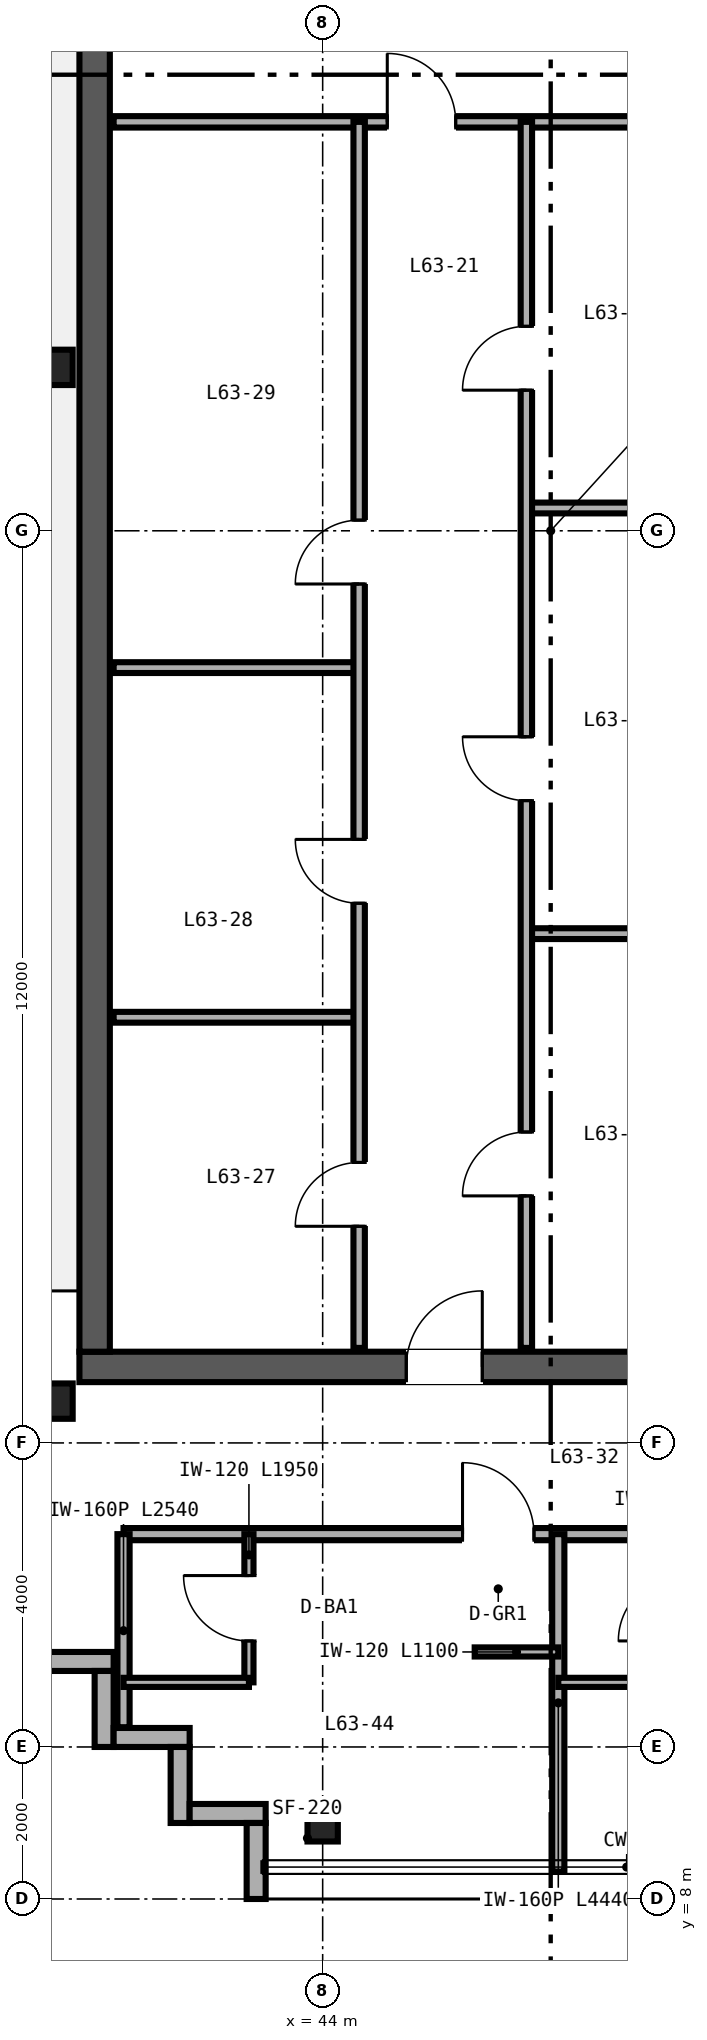
"""IFC4 building model, lengths in metres.
Left out: names, types, materials, properties, quantities, classifications, styles, units other than length and angle.
Written with IfcOpenShell. Run it as: python <this file> out.ifc"""

import sys

from ifc_helpers import new_model, si_unit, direction, frame, frame_2d, origin, origin_2d, place, context, subcontext, project, spatial, rectangle, i_section, extrude, source, transform, mapped, element, fill, save


model = new_model("IFC4")
c1 = context("Model", 3, precision=1e-05, world=origin(), true_north=direction((0.0, 1.0)))
c2 = subcontext(c1, "Body", "Model", "MODEL_VIEW")
j1 = project(units=[si_unit("LENGTHUNIT", "METRE"), si_unit("PLANEANGLEUNIT", "RADIAN")], contexts=[c1])
p1 = place(None, origin())
s1 = spatial("IfcSite", under=j1, at=p1, CompositionType="ELEMENT")
p2 = place(p1, origin())
s2 = spatial("IfcBuilding", under=s1, at=p2, CompositionType="ELEMENT")
p3 = place(p2, frame((0.0, 0.0, 250.8)))
s3 = spatial("IfcBuildingStorey", under=s2, at=p3, CompositionType="ELEMENT", Elevation=250.8)
p4 = place(p3, frame((40.8, 15.0, 0.0), z_axis=(0.0, 0.0, 1.0), x_axis=(1.0, 0.0, 0.0)))
e1 = element("IfcWall", 1, at=p4, inside=s3, PredefinedType="SHEAR", context=c2, shape_type="SweptSolid", body=[
    extrude(rectangle(XDim=12.4, YDim=0.4, at=frame_2d((6.2, 0.0))), origin(), (0.0, 0.0, 1.0), 3.38),
])
p5 = place(p4, frame((4.3, 0.0, 0.0)))
e2 = element("IfcOpeningElement", 2, at=p5, cuts=e1, PredefinedType="OPENING", context=c2, shape_type="SweptSolid", body=[
    extrude(rectangle(XDim=1.0, YDim=2.15, at=frame_2d((0.5, 1.075))), frame((0.0, 0.21, 0.0), z_axis=(0.0, -1.0, 0.0), x_axis=(1.0, 0.0, 0.0)), (0.0, 0.0, 1.0), 0.42),
])
p6 = place(p3, frame((41.0, 15.2, 0.0), z_axis=(0.0, 0.0, 1.0), x_axis=(0.0, 1.0, 0.0)))
e3 = element("IfcWall", 3, at=p6, inside=s3, PredefinedType="SHEAR", context=c2, shape_type="SweptSolid", body=[
    extrude(rectangle(XDim=21.6, YDim=0.4, at=frame_2d((10.8, 0.0))), origin(), (0.0, 0.0, 1.0), 3.38),
])
m1 = source(origin(), c2, "Body", "SweptSolid", [
    extrude(i_section(OverallWidth=0.422, OverallDepth=0.465, WebThickness=0.045, FlangeThickness=0.073, FilletRadius=0.025, at=origin_2d()), origin(), (0.0, 0.0, 1.0), 3.38),
])
for number, where, z_axis, x_axis in (
    (4, (40.5, 14.55, 0.0), (0.0, 0.0, 1.0), (1.0, 0.0, 0.0)),
    (5, (40.5, 28.15, 0.0), (0.0, 0.0, 1.0), (1.0, 0.0, 0.0)),
):
    element("IfcColumn", number, at=place(p3, frame(where, z_axis=z_axis, x_axis=x_axis)), inside=s3, PredefinedType="COLUMN", context=c2, shape_type="MappedRepresentation", body=[
        mapped(m1, transform((0.0, 0.0, 0.0), scale=1.0)),
    ])
m2 = source(origin(), c2, "Body", "SweptSolid", [
    extrude(i_section(OverallWidth=0.399, OverallDepth=0.387, WebThickness=0.021, FlangeThickness=0.033, FilletRadius=0.025, at=origin_2d()), origin(), (0.0, 0.0, 1.0), 3.38),
])
p7 = place(p3, frame((44.0, 8.95, 0.0), z_axis=(0.0, 0.0, 1.0), x_axis=(1.0, 0.0, 0.0)))
e6 = element("IfcColumn", 6, at=p7, inside=s3, PredefinedType="COLUMN", context=c2, shape_type="MappedRepresentation", body=[
    mapped(m2, transform((0.0, 0.0, 0.0), scale=1.0)),
])
p8 = place(p3, frame((40.0, 11.125, 0.0), z_axis=(0.0, 0.0, 1.0), x_axis=(1.0, 0.0, 0.0)))
e7 = element("IfcWall", 7, at=p8, inside=s3, PredefinedType="SOLIDWALL", context=c2, shape_type="SweptSolid", body=[
    extrude(rectangle(XDim=1.25, YDim=0.25, at=frame_2d((0.625, 0.0))), origin(), (0.0, 0.0, 1.0), 3.38),
])
for number, where, z_axis, x_axis in (
    (8, (41.125, 11.0, 0.0), (0.0, 0.0, 1.0), (0.0, -1.0, 0.0)),
    (9, (41.25, 10.125, 0.0), (0.0, 0.0, 1.0), (1.0, 0.0, 0.0)),
    (10, (42.125, 10.0, 0.0), (0.0, 0.0, 1.0), (0.0, -1.0, 0.0)),
    (11, (42.25, 9.125, 0.0), (0.0, 0.0, 1.0), (1.0, 0.0, 0.0)),
    (12, (43.125, 9.0, 0.0), (0.0, 0.0, 1.0), (0.0, -1.0, 0.0)),
):
    element("IfcWall", number, at=place(p3, frame(where, z_axis=z_axis, x_axis=x_axis)), inside=s3, PredefinedType="SOLIDWALL", context=c2, shape_type="SweptSolid", body=[
        extrude(rectangle(XDim=1.0, YDim=0.25, at=frame_2d((0.5, 0.0))), origin(), (0.0, 0.0, 1.0), 3.38),
    ])
p9 = place(p3, frame((41.25, 31.38, 0.0), z_axis=(0.0, 0.0, 1.0), x_axis=(1.0, 0.0, 0.0)))
e13 = element("IfcWall", 13, at=p9, inside=s3, PredefinedType="PARTITIONING", context=c2, shape_type="SweptSolid", body=[
    extrude(rectangle(XDim=7.87, YDim=0.15, at=frame_2d((3.935, 0.0))), origin(), (0.0, 0.0, 1.0), 2.48),
])
p10 = place(p9, frame((3.6, 0.0, 0.0)))
e14 = element("IfcOpeningElement", 14, at=p10, cuts=e13, PredefinedType="OPENING", context=c2, shape_type="SweptSolid", body=[
    extrude(rectangle(XDim=0.9, YDim=2.15, at=frame_2d((0.45, 1.075))), frame((0.0, 0.085, 0.0), z_axis=(0.0, -1.0, 0.0), x_axis=(1.0, 0.0, 0.0)), (0.0, 0.0, 1.0), 0.17),
])
for number, where, z_axis, x_axis in (
    (15, (46.68, 20.7, 0.0), (0.0, 0.0, 1.0), (1.0, 0.0, 0.0)),
    (16, (46.68, 26.3, 0.0), (0.0, 0.0, 1.0), (1.0, 0.0, 0.0)),
):
    element("IfcWall", number, at=place(p3, frame(where, z_axis=z_axis, x_axis=x_axis)), inside=s3, PredefinedType="PARTITIONING", context=c2, shape_type="SweptSolid", body=[
        extrude(rectangle(XDim=2.44, YDim=0.142, at=frame_2d((1.22, 0.0))), origin(), (0.0, 0.0, 1.0), 3.38),
    ])
p11 = place(p3, frame((46.68, 15.25, 0.0), z_axis=(0.0, 0.0, 1.0), x_axis=(0.0, 1.0, 0.0)))
e17 = element("IfcWall", 17, at=p11, inside=s3, PredefinedType="PARTITIONING", context=c2, shape_type="SweptSolid", body=[
    extrude(rectangle(XDim=16.13, YDim=0.15, at=frame_2d((8.065, 0.0))), origin(), (0.0, 0.0, 1.0), 2.453),
])
p12 = place(p11, frame((2.0, 0.0, 0.0)))
e18 = element("IfcOpeningElement", 18, at=p12, cuts=e17, PredefinedType="OPENING", context=c2, shape_type="SweptSolid", body=[
    extrude(rectangle(XDim=0.84, YDim=2.1, at=frame_2d((0.42, 1.05))), frame((0.0, 0.085, 0.0), z_axis=(0.0, -1.0, 0.0), x_axis=(1.0, 0.0, 0.0)), (0.0, 0.0, 1.0), 0.17),
])
p13 = place(p11, frame((7.2, 0.0, 0.0)))
e19 = element("IfcOpeningElement", 19, at=p13, cuts=e17, PredefinedType="OPENING", context=c2, shape_type="SweptSolid", body=[
    extrude(rectangle(XDim=0.84, YDim=2.1, at=frame_2d((0.42, 1.05))), frame((0.0, 0.085, 0.0), z_axis=(0.0, -1.0, 0.0), x_axis=(1.0, 0.0, 0.0)), (0.0, 0.0, 1.0), 0.17),
])
p14 = place(p11, frame((12.6, 0.0, 0.0)))
e20 = element("IfcOpeningElement", 20, at=p14, cuts=e17, PredefinedType="OPENING", context=c2, shape_type="SweptSolid", body=[
    extrude(rectangle(XDim=0.84, YDim=2.1, at=frame_2d((0.42, 1.05))), frame((0.0, 0.085, 0.0), z_axis=(0.0, -1.0, 0.0), x_axis=(1.0, 0.0, 0.0)), (0.0, 0.0, 1.0), 0.17),
])
for number, where, z_axis, x_axis in (
    (21, (41.25, 19.6, 0.0), (0.0, 0.0, 1.0), (1.0, 0.0, 0.0)),
    (22, (41.25, 24.2, 0.0), (0.0, 0.0, 1.0), (1.0, 0.0, 0.0)),
):
    element("IfcWall", number, at=place(p3, frame(where, z_axis=z_axis, x_axis=x_axis)), inside=s3, PredefinedType="PARTITIONING", context=c2, shape_type="SweptSolid", body=[
        extrude(rectangle(XDim=3.23, YDim=0.142, at=frame_2d((1.615, 0.0))), origin(), (0.0, 0.0, 1.0), 3.38),
    ])
p15 = place(p3, frame((44.48, 15.25, 0.0), z_axis=(0.0, 0.0, 1.0), x_axis=(0.0, 1.0, 0.0)))
e23 = element("IfcWall", 23, at=p15, inside=s3, PredefinedType="PARTITIONING", context=c2, shape_type="SweptSolid", body=[
    extrude(rectangle(XDim=16.13, YDim=0.15, at=frame_2d((8.065, 0.0))), origin(), (0.0, 0.0, 1.0), 2.453),
])
p16 = place(p15, frame((1.6, 0.0, 0.0)))
e24 = element("IfcOpeningElement", 24, at=p16, cuts=e23, PredefinedType="OPENING", context=c2, shape_type="SweptSolid", body=[
    extrude(rectangle(XDim=0.84, YDim=2.1, at=frame_2d((0.42, 1.05))), frame((0.0, 0.085, 0.0), z_axis=(0.0, -1.0, 0.0), x_axis=(1.0, 0.0, 0.0)), (0.0, 0.0, 1.0), 0.17),
])
p17 = place(p15, frame((5.85, 0.0, 0.0)))
e25 = element("IfcOpeningElement", 25, at=p17, cuts=e23, PredefinedType="OPENING", context=c2, shape_type="SweptSolid", body=[
    extrude(rectangle(XDim=0.84, YDim=2.1, at=frame_2d((0.42, 1.05))), frame((0.0, 0.085, 0.0), z_axis=(0.0, -1.0, 0.0), x_axis=(1.0, 0.0, 0.0)), (0.0, 0.0, 1.0), 0.17),
])
p18 = place(p15, frame((10.05, 0.0, 0.0)))
e26 = element("IfcOpeningElement", 26, at=p18, cuts=e23, PredefinedType="OPENING", context=c2, shape_type="SweptSolid", body=[
    extrude(rectangle(XDim=0.84, YDim=2.1, at=frame_2d((0.42, 1.05))), frame((0.0, 0.085, 0.0), z_axis=(0.0, -1.0, 0.0), x_axis=(1.0, 0.0, 0.0)), (0.0, 0.0, 1.0), 0.17),
])
p19 = place(p3, frame((41.38, 12.8, 0.0), z_axis=(0.0, 0.0, 1.0), x_axis=(1.0, 0.0, 0.0)))
e27 = element("IfcWall", 27, at=p19, inside=s3, PredefinedType="PARTITIONING", context=c2, shape_type="SweptSolid", body=[
    extrude(rectangle(XDim=11.52, YDim=0.16, at=frame_2d((5.76, 0.0))), origin(), (0.0, 0.0, 1.0), 3.38),
])
p20 = place(p19, frame((4.46, 0.0, 0.0)))
e28 = element("IfcOpeningElement", 28, at=p20, cuts=e27, PredefinedType="OPENING", context=c2, shape_type="SweptSolid", body=[
    extrude(rectangle(XDim=0.94, YDim=2.15, at=frame_2d((0.47, 1.075))), frame((0.0, 0.09, 0.0), z_axis=(0.0, -1.0, 0.0), x_axis=(1.0, 0.0, 0.0)), (0.0, 0.0, 1.0), 0.18),
])
p21 = place(p19, frame((10.26, 0.0, 0.0)))
e29 = element("IfcOpeningElement", 29, at=p21, cuts=e27, PredefinedType="OPENING", context=c2, shape_type="SweptSolid", body=[
    extrude(rectangle(XDim=0.94, YDim=2.15, at=frame_2d((0.47, 1.075))), frame((0.0, 0.09, 0.0), z_axis=(0.0, -1.0, 0.0), x_axis=(1.0, 0.0, 0.0)), (0.0, 0.0, 1.0), 0.18),
])
p22 = place(p3, frame((41.38, 10.26, 0.0), z_axis=(0.0, 0.0, 1.0), x_axis=(0.0, 1.0, 0.0)))
e30 = element("IfcWall", 30, at=p22, inside=s3, PredefinedType="PARTITIONING", context=c2, shape_type="SweptSolid", body=[
    extrude(rectangle(XDim=2.54, YDim=0.16, at=frame_2d((1.27, 0.0))), origin(), (0.0, 0.0, 1.0), 3.38),
])
p23 = place(p3, frame((47.1, 8.36, 0.0), z_axis=(0.0, 0.0, 1.0), x_axis=(0.0, 1.0, 0.0)))
e31 = element("IfcWall", 31, at=p23, inside=s3, PredefinedType="PARTITIONING", context=c2, shape_type="SweptSolid", body=[
    extrude(rectangle(XDim=4.44, YDim=0.16, at=frame_2d((2.22, 0.0))), origin(), (0.0, 0.0, 1.0), 2.687),
])
p24 = place(p3, frame((43.03, 10.85, 0.0), z_axis=(0.0, 0.0, 1.0), x_axis=(0.0, 1.0, 0.0)))
e32 = element("IfcWall", 32, at=p24, inside=s3, PredefinedType="PARTITIONING", context=c2, shape_type="SweptSolid", body=[
    extrude(rectangle(XDim=1.95, YDim=0.12, at=frame_2d((0.975, 0.0))), origin(), (0.0, 0.0, 1.0), 3.38),
])
p25 = place(p24, frame((0.545, 0.0, 0.0)))
e33 = element("IfcOpeningElement", 33, at=p25, cuts=e32, PredefinedType="OPENING", context=c2, shape_type="SweptSolid", body=[
    extrude(rectangle(XDim=0.86, YDim=2.1, at=frame_2d((0.43, 1.05))), frame((0.0, 0.07, 0.0), z_axis=(0.0, -1.0, 0.0), x_axis=(1.0, 0.0, 0.0)), (0.0, 0.0, 1.0), 0.14),
])
p26 = place(p3, frame((41.38, 10.85, 0.0), z_axis=(0.0, 0.0, 1.0), x_axis=(1.0, 0.0, 0.0)))
e34 = element("IfcWall", 34, at=p26, inside=s3, PredefinedType="PARTITIONING", context=c2, shape_type="SweptSolid", body=[
    extrude(rectangle(XDim=1.65, YDim=0.12, at=frame_2d((0.825, 0.0))), origin(), (0.0, 0.0, 1.0), 3.38),
])
p27 = place(p3, frame((46.0, 11.25, 0.0), z_axis=(0.0, 0.0, 1.0), x_axis=(1.0, 0.0, 0.0)))
e35 = element("IfcWall", 35, at=p27, inside=s3, PredefinedType="PARTITIONING", context=c2, shape_type="SweptSolid", body=[
    extrude(rectangle(XDim=1.1, YDim=0.12, at=frame_2d((0.55, 0.0))), origin(), (0.0, 0.0, 1.0), 3.38),
])
p28 = place(p3, frame((47.1, 10.85, 0.0), z_axis=(0.0, 0.0, 1.0), x_axis=(1.0, 0.0, 0.0)))
e36 = element("IfcWall", 36, at=p28, inside=s3, PredefinedType="PARTITIONING", context=c2, shape_type="SweptSolid", body=[
    extrude(rectangle(XDim=1.65, YDim=0.12, at=frame_2d((0.825, 0.0))), origin(), (0.0, 0.0, 1.0), 3.38),
])
m3 = source(origin(), c2, "Body", "SweptSolid", [
    extrude(rectangle(XDim=0.84, YDim=2.1, at=frame_2d((0.42, 1.05))), frame((0.0, 0.025, 0.0), z_axis=(0.0, -1.0, 0.0), x_axis=(1.0, 0.0, 0.0)), (0.0, 0.0, 1.0), 0.05),
])
p29 = place(p12, origin())
e37 = element("IfcDoor", 37, at=p29, inside=s3, OperationType="SINGLE_SWING_LEFT", PredefinedType="DOOR", context=c2, shape_type="MappedRepresentation", body=[
    mapped(m3, transform((0.0, 0.0, 0.0), scale=1.0)),
])
fill(e18, e37)
p30 = place(p13, origin())
e38 = element("IfcDoor", 38, at=p30, inside=s3, OperationType="SINGLE_SWING_RIGHT", PredefinedType="DOOR", context=c2, shape_type="MappedRepresentation", body=[
    mapped(m3, transform((0.0, 0.0, 0.0), scale=1.0)),
])
fill(e19, e38)
p31 = place(p14, origin())
e39 = element("IfcDoor", 39, at=p31, inside=s3, OperationType="SINGLE_SWING_LEFT", PredefinedType="DOOR", context=c2, shape_type="MappedRepresentation", body=[
    mapped(m3, transform((0.0, 0.0, 0.0), scale=1.0)),
])
fill(e20, e39)
m4 = source(origin(), c2, "Body", "SweptSolid", [
    extrude(rectangle(XDim=0.9, YDim=2.15, at=frame_2d((0.45, 1.075))), frame((0.0, 0.025, 0.0), z_axis=(0.0, -1.0, 0.0), x_axis=(1.0, 0.0, 0.0)), (0.0, 0.0, 1.0), 0.05),
])
p32 = place(p10, origin())
e40 = element("IfcDoor", 40, at=p32, inside=s3, OperationType="SINGLE_SWING_LEFT", PredefinedType="DOOR", context=c2, shape_type="MappedRepresentation", body=[
    mapped(m4, transform((0.0, 0.0, 0.0), scale=1.0)),
])
fill(e14, e40)
m5 = source(origin(), c2, "Body", "SweptSolid", [
    extrude(rectangle(XDim=1.0, YDim=2.15, at=frame_2d((0.5, 1.075))), frame((0.0, 0.025, 0.0), z_axis=(0.0, -1.0, 0.0), x_axis=(1.0, 0.0, 0.0)), (0.0, 0.0, 1.0), 0.05),
])
p33 = place(p5, origin())
e41 = element("IfcDoor", 41, at=p33, inside=s3, OperationType="SINGLE_SWING_RIGHT", PredefinedType="DOOR", context=c2, shape_type="MappedRepresentation", body=[
    mapped(m5, transform((0.0, 0.0, 0.0), scale=1.0)),
])
fill(e2, e41)
p34 = place(p16, origin())
e42 = element("IfcDoor", 42, at=p34, inside=s3, OperationType="SINGLE_SWING_LEFT", PredefinedType="DOOR", context=c2, shape_type="MappedRepresentation", body=[
    mapped(m3, transform((0.0, 0.0, 0.0), scale=1.0)),
])
fill(e24, e42)
p35 = place(p17, origin())
e43 = element("IfcDoor", 43, at=p35, inside=s3, OperationType="SINGLE_SWING_RIGHT", PredefinedType="DOOR", context=c2, shape_type="MappedRepresentation", body=[
    mapped(m3, transform((0.0, 0.0, 0.0), scale=1.0)),
])
fill(e25, e43)
p36 = place(p18, origin())
e44 = element("IfcDoor", 44, at=p36, inside=s3, OperationType="SINGLE_SWING_LEFT", PredefinedType="DOOR", context=c2, shape_type="MappedRepresentation", body=[
    mapped(m3, transform((0.0, 0.0, 0.0), scale=1.0)),
])
fill(e26, e44)
m6 = source(origin(), c2, "Body", "SweptSolid", [
    extrude(rectangle(XDim=0.86, YDim=2.1, at=frame_2d((0.43, 1.05))), frame((0.0, 0.025, 0.0), z_axis=(0.0, -1.0, 0.0), x_axis=(1.0, 0.0, 0.0)), (0.0, 0.0, 1.0), 0.05),
])
p37 = place(p25, origin())
e45 = element("IfcDoor", 45, at=p37, inside=s3, OperationType="SINGLE_SWING_RIGHT", PredefinedType="DOOR", context=c2, shape_type="MappedRepresentation", body=[
    mapped(m6, transform((0.0, 0.0, 0.0), scale=1.0)),
])
fill(e33, e45)
m7 = source(origin(), c2, "Body", "SweptSolid", [
    extrude(rectangle(XDim=0.94, YDim=2.15, at=frame_2d((0.47, 1.075))), frame((0.0, 0.025, 0.0), z_axis=(0.0, -1.0, 0.0), x_axis=(1.0, 0.0, 0.0)), (0.0, 0.0, 1.0), 0.05),
])
p38 = place(p20, origin())
e46 = element("IfcDoor", 46, at=p38, inside=s3, OperationType="SINGLE_SWING_LEFT", PredefinedType="DOOR", context=c2, shape_type="MappedRepresentation", body=[
    mapped(m7, transform((0.0, 0.0, 0.0), scale=1.0)),
])
fill(e28, e46)
save(model, sys.argv[1])
